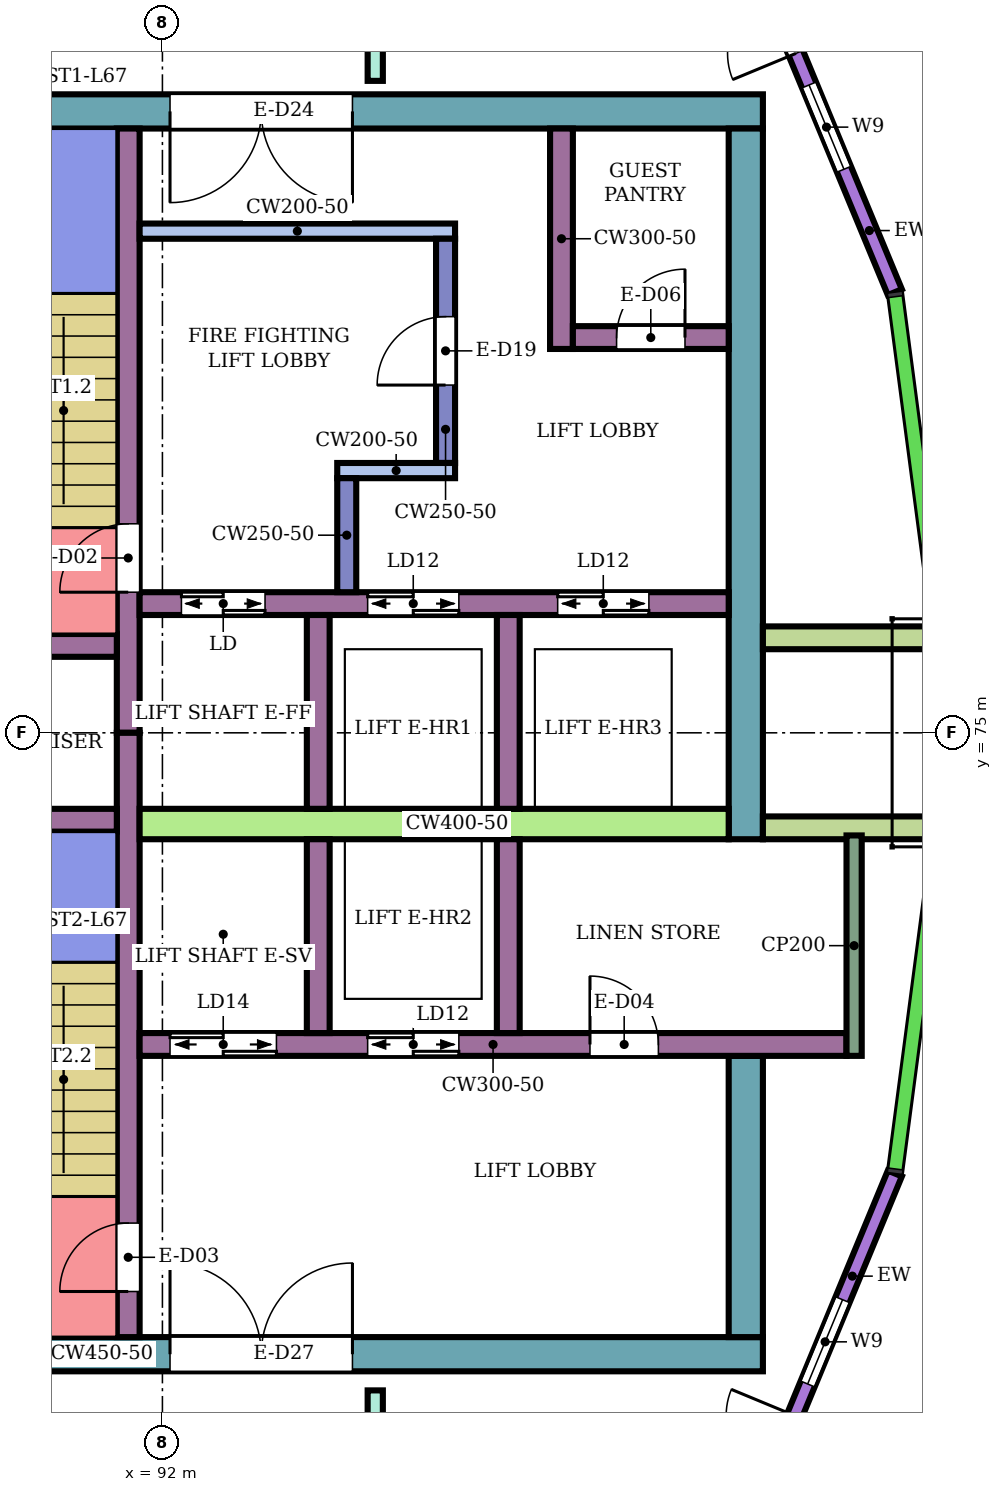
"""IFC4 building model, lengths in metres.
Left out: names, types, materials, properties, quantities, classifications, styles, units other than length and angle.
Written with IfcOpenShell. Run it as: python <this file> out.ifc"""

import sys

from ifc_helpers import new_model, si_unit, direction, frame, frame_2d, origin, place, context, subcontext, project, spatial, rectangle, extrude, element, fill, save


model = new_model("IFC4")
c1 = context("Model", 3, precision=1e-05, world=origin(), true_north=direction((0.0, 1.0)))
c2 = subcontext(c1, "Body", "Model", "MODEL_VIEW")
j1 = project(units=[si_unit("LENGTHUNIT", "METRE"), si_unit("PLANEANGLEUNIT", "RADIAN")], contexts=[c1])
p1 = place(None, origin())
s1 = spatial("IfcSite", under=j1, at=p1, CompositionType="ELEMENT")
p2 = place(p1, origin())
s2 = spatial("IfcBuilding", under=s1, at=p2, CompositionType="ELEMENT")
p3 = place(p2, frame((0.0, 0.0, 292.5)))
s3 = spatial("IfcBuildingStorey", under=s2, at=p3, CompositionType="ELEMENT", Elevation=292.5)
p4 = place(p3, frame((87.9, 83.175, 0.0), z_axis=(0.0, 0.0, 1.0), x_axis=(1.0, 0.0, 0.0)))
e1 = element("IfcWall", 1, at=p4, inside=s3, PredefinedType="SHEAR", context=c2, shape_type="SweptSolid", body=[
    extrude(rectangle(XDim=12.0, YDim=0.45, at=frame_2d((6.0, 0.0))), origin(), (0.0, 0.0, 1.0), 3.88),
])
p5 = place(p4, frame((4.2, 0.0, 0.0)))
e2 = element("IfcOpeningElement", 2, at=p5, cuts=e1, PredefinedType="OPENING", context=c2, shape_type="SweptSolid", body=[
    extrude(rectangle(XDim=2.4, YDim=2.4, at=frame_2d((1.2, 1.2))), frame((0.0, 0.235, 0.0), z_axis=(0.0, -1.0, 0.0), x_axis=(1.0, 0.0, 0.0)), (0.0, 0.0, 1.0), 0.47),
])
p6 = place(p3, frame((87.9, 66.825, 0.0), z_axis=(0.0, 0.0, 1.0), x_axis=(1.0, 0.0, 0.0)))
e3 = element("IfcWall", 3, at=p6, inside=s3, PredefinedType="SHEAR", context=c2, shape_type="SweptSolid", body=[
    extrude(rectangle(XDim=12.0, YDim=0.45, at=frame_2d((6.0, 0.0))), origin(), (0.0, 0.0, 1.0), 3.88),
])
p7 = place(p6, frame((4.2, 0.0, 0.0)))
e4 = element("IfcOpeningElement", 4, at=p7, cuts=e3, PredefinedType="OPENING", context=c2, shape_type="SweptSolid", body=[
    extrude(rectangle(XDim=2.4, YDim=2.4, at=frame_2d((1.2, 1.2))), frame((0.0, 0.235, 0.0), z_axis=(0.0, -1.0, 0.0), x_axis=(1.0, 0.0, 0.0)), (0.0, 0.0, 1.0), 0.47),
])
p8 = place(p3, frame((99.675, 73.6, 0.0), z_axis=(0.0, 0.0, 1.0), x_axis=(0.0, 1.0, 0.0)))
e5 = element("IfcWall", 5, at=p8, inside=s3, PredefinedType="SHEAR", context=c2, shape_type="SweptSolid", body=[
    extrude(rectangle(XDim=9.35, YDim=0.45, at=frame_2d((4.675, 0.0))), origin(), (0.0, 0.0, 1.0), 3.88),
])
p9 = place(p3, frame((99.675, 67.05, 0.0), z_axis=(0.0, 0.0, 1.0), x_axis=(0.0, 1.0, 0.0)))
e6 = element("IfcWall", 6, at=p9, inside=s3, PredefinedType="SHEAR", context=c2, shape_type="SweptSolid", body=[
    extrude(rectangle(XDim=3.7, YDim=0.45, at=frame_2d((1.85, 0.0))), origin(), (0.0, 0.0, 1.0), 3.88),
])
p10 = place(p3, frame((91.55, 75.0, 0.0), z_axis=(0.0, 0.0, 1.0), x_axis=(0.0, 1.0, 0.0)))
e7 = element("IfcWall", 7, at=p10, inside=s3, PredefinedType="SHEAR", context=c2, shape_type="SweptSolid", body=[
    extrude(rectangle(XDim=7.95, YDim=0.3, at=frame_2d((3.975, 0.0))), origin(), (0.0, 0.0, 1.0), 3.88),
])
p11 = place(p10, frame((1.85, 0.0, 0.0)))
e8 = element("IfcOpeningElement", 8, at=p11, cuts=e7, PredefinedType="OPENING", context=c2, shape_type="SweptSolid", body=[
    extrude(rectangle(XDim=0.9, YDim=2.1, at=frame_2d((0.45, 1.05))), frame((0.0, 0.16, 0.0), z_axis=(0.0, -1.0, 0.0), x_axis=(1.0, 0.0, 0.0)), (0.0, 0.0, 1.0), 0.32),
])
p12 = place(p3, frame((91.55, 67.05, 0.0), z_axis=(0.0, 0.0, 1.0), x_axis=(0.0, 1.0, 0.0)))
e9 = element("IfcWall", 9, at=p12, inside=s3, PredefinedType="SHEAR", context=c2, shape_type="SweptSolid", body=[
    extrude(rectangle(XDim=7.95, YDim=0.3, at=frame_2d((3.975, 0.0))), origin(), (0.0, 0.0, 1.0), 3.88),
])
p13 = place(p12, frame((0.6, 0.0, 0.0)))
e10 = element("IfcOpeningElement", 10, at=p13, cuts=e9, PredefinedType="OPENING", context=c2, shape_type="SweptSolid", body=[
    extrude(rectangle(XDim=0.9, YDim=2.1, at=frame_2d((0.45, 1.05))), frame((0.0, 0.16, 0.0), z_axis=(0.0, -1.0, 0.0), x_axis=(1.0, 0.0, 0.0)), (0.0, 0.0, 1.0), 0.32),
])
p14 = place(p3, frame((88.35, 76.15, 0.0), z_axis=(0.0, 0.0, 1.0), x_axis=(1.0, 0.0, 0.0)))
e11 = element("IfcWall", 11, at=p14, inside=s3, PredefinedType="SHEAR", context=c2, shape_type="SweptSolid", body=[
    extrude(rectangle(XDim=3.05, YDim=0.3, at=frame_2d((1.525, 0.0))), origin(), (0.0, 0.0, 1.0), 3.88),
])
p15 = place(p14, frame((1.1, 0.0, 0.0)))
e12 = element("IfcOpeningElement", 12, at=p15, cuts=e11, PredefinedType="OPENING", context=c2, shape_type="SweptSolid", body=[
    extrude(rectangle(XDim=0.7, YDim=2.0, at=frame_2d((0.35, 1.0))), frame((0.0, 0.16, 0.0), z_axis=(0.0, -1.0, 0.0), x_axis=(1.0, 0.0, 0.0)), (0.0, 0.0, 1.0), 0.32),
])
p16 = place(p3, frame((88.35, 73.85, 0.0), z_axis=(0.0, 0.0, 1.0), x_axis=(1.0, 0.0, 0.0)))
e13 = element("IfcWall", 13, at=p16, inside=s3, PredefinedType="SHEAR", context=c2, shape_type="SweptSolid", body=[
    extrude(rectangle(XDim=3.05, YDim=0.3, at=frame_2d((1.525, 0.0))), origin(), (0.0, 0.0, 1.0), 3.88),
])
p17 = place(p3, frame((91.7, 76.7, 0.0), z_axis=(0.0, 0.0, 1.0), x_axis=(1.0, 0.0, 0.0)))
e14 = element("IfcWall", 14, at=p17, inside=s3, PredefinedType="SHEAR", context=c2, shape_type="SweptSolid", body=[
    extrude(rectangle(XDim=7.75, YDim=0.3, at=frame_2d((3.875, 0.0))), origin(), (0.0, 0.0, 1.0), 3.88),
])
p18 = place(p17, frame((0.55, 0.0, 0.0)))
e15 = element("IfcOpeningElement", 15, at=p18, cuts=e14, PredefinedType="OPENING", context=c2, shape_type="SweptSolid", body=[
    extrude(rectangle(XDim=1.1, YDim=2.1, at=frame_2d((0.55, 1.05))), frame((0.0, 0.16, 0.0), z_axis=(0.0, -1.0, 0.0), x_axis=(1.0, 0.0, 0.0)), (0.0, 0.0, 1.0), 0.32),
])
p19 = place(p17, frame((3.0, 0.0, 0.0)))
e16 = element("IfcOpeningElement", 16, at=p19, cuts=e14, PredefinedType="OPENING", context=c2, shape_type="SweptSolid", body=[
    extrude(rectangle(XDim=1.2, YDim=2.1, at=frame_2d((0.6, 1.05))), frame((0.0, 0.16, 0.0), z_axis=(0.0, -1.0, 0.0), x_axis=(1.0, 0.0, 0.0)), (0.0, 0.0, 1.0), 0.32),
])
p20 = place(p17, frame((5.5, 0.0, 0.0)))
e17 = element("IfcOpeningElement", 17, at=p20, cuts=e14, PredefinedType="OPENING", context=c2, shape_type="SweptSolid", body=[
    extrude(rectangle(XDim=1.2, YDim=2.1, at=frame_2d((0.6, 1.05))), frame((0.0, 0.16, 0.0), z_axis=(0.0, -1.0, 0.0), x_axis=(1.0, 0.0, 0.0)), (0.0, 0.0, 1.0), 0.32),
])
p21 = place(p3, frame((91.7, 73.8, 0.0), z_axis=(0.0, 0.0, 1.0), x_axis=(1.0, 0.0, 0.0)))
e18 = element("IfcWall", 18, at=p21, inside=s3, PredefinedType="SHEAR", context=c2, shape_type="SweptSolid", body=[
    extrude(rectangle(XDim=7.75, YDim=0.4, at=frame_2d((3.875, 0.0))), origin(), (0.0, 0.0, 1.0), 3.88),
])
p22 = place(p3, frame((91.7, 70.9, 0.0), z_axis=(0.0, 0.0, 1.0), x_axis=(1.0, 0.0, 0.0)))
e19 = element("IfcWall", 19, at=p22, inside=s3, PredefinedType="SHEAR", context=c2, shape_type="SweptSolid", body=[
    extrude(rectangle(XDim=9.3, YDim=0.3, at=frame_2d((4.65, 0.0))), origin(), (0.0, 0.0, 1.0), 3.88),
])
p23 = place(p22, frame((0.4, 0.0, 0.0)))
e20 = element("IfcOpeningElement", 20, at=p23, cuts=e19, PredefinedType="OPENING", context=c2, shape_type="SweptSolid", body=[
    extrude(rectangle(XDim=1.4, YDim=2.1, at=frame_2d((0.7, 1.05))), frame((0.0, 0.16, 0.0), z_axis=(0.0, -1.0, 0.0), x_axis=(1.0, 0.0, 0.0)), (0.0, 0.0, 1.0), 0.32),
])
p24 = place(p22, frame((3.0, 0.0, 0.0)))
e21 = element("IfcOpeningElement", 21, at=p24, cuts=e19, PredefinedType="OPENING", context=c2, shape_type="SweptSolid", body=[
    extrude(rectangle(XDim=1.2, YDim=2.1, at=frame_2d((0.6, 1.05))), frame((0.0, 0.16, 0.0), z_axis=(0.0, -1.0, 0.0), x_axis=(1.0, 0.0, 0.0)), (0.0, 0.0, 1.0), 0.32),
])
p25 = place(p22, frame((5.925, 0.0, 0.0)))
e22 = element("IfcOpeningElement", 22, at=p25, cuts=e19, PredefinedType="OPENING", context=c2, shape_type="SweptSolid", body=[
    extrude(rectangle(XDim=0.9, YDim=2.1, at=frame_2d((0.45, 1.05))), frame((0.0, 0.16, 0.0), z_axis=(0.0, -1.0, 0.0), x_axis=(1.0, 0.0, 0.0)), (0.0, 0.0, 1.0), 0.32),
])
for number, where, z_axis, x_axis in (
    (23, (94.05, 74.0, 0.0), (0.0, 0.0, 1.0), (0.0, 1.0, 0.0)),
    (24, (96.55, 74.0, 0.0), (0.0, 0.0, 1.0), (0.0, 1.0, 0.0)),
    (25, (94.05, 71.05, 0.0), (0.0, 0.0, 1.0), (0.0, 1.0, 0.0)),
    (26, (96.55, 71.05, 0.0), (0.0, 0.0, 1.0), (0.0, 1.0, 0.0)),
):
    element("IfcWall", number, at=place(p3, frame(where, z_axis=z_axis, x_axis=x_axis)), inside=s3, PredefinedType="SHEAR", context=c2, shape_type="SweptSolid", body=[
        extrude(rectangle(XDim=2.55, YDim=0.3, at=frame_2d((1.275, 0.0))), origin(), (0.0, 0.0, 1.0), 3.88),
    ])
p26 = place(p3, frame((91.7, 81.6, 0.0), z_axis=(0.0, 0.0, 1.0), x_axis=(1.0, 0.0, 0.0)))
e27 = element("IfcWall", 27, at=p26, inside=s3, PredefinedType="SHEAR", context=c2, shape_type="SweptSolid", body=[
    extrude(rectangle(XDim=4.15, YDim=0.2, at=frame_2d((2.075, 0.0))), origin(), (0.0, 0.0, 1.0), 3.88),
])
p27 = place(p3, frame((95.725, 78.55, 0.0), z_axis=(0.0, 0.0, 1.0), x_axis=(0.0, 1.0, 0.0)))
e28 = element("IfcWall", 28, at=p27, inside=s3, PredefinedType="SHEAR", context=c2, shape_type="SweptSolid", body=[
    extrude(rectangle(XDim=2.95, YDim=0.25, at=frame_2d((1.475, 0.0))), origin(), (0.0, 0.0, 1.0), 3.88),
])
p28 = place(p27, frame((1.025, 0.0, 0.0)))
e29 = element("IfcOpeningElement", 29, at=p28, cuts=e28, PredefinedType="OPENING", context=c2, shape_type="SweptSolid", body=[
    extrude(rectangle(XDim=0.9, YDim=2.1, at=frame_2d((0.45, 1.05))), frame((0.0, 0.135, 0.0), z_axis=(0.0, -1.0, 0.0), x_axis=(1.0, 0.0, 0.0)), (0.0, 0.0, 1.0), 0.27),
])
p29 = place(p3, frame((94.3, 78.45, 0.0), z_axis=(0.0, 0.0, 1.0), x_axis=(1.0, 0.0, 0.0)))
e30 = element("IfcWall", 30, at=p29, inside=s3, PredefinedType="SHEAR", context=c2, shape_type="SweptSolid", body=[
    extrude(rectangle(XDim=1.55, YDim=0.2, at=frame_2d((0.775, 0.0))), origin(), (0.0, 0.0, 1.0), 3.88),
])
p30 = place(p3, frame((94.425, 76.85, 0.0), z_axis=(0.0, 0.0, 1.0), x_axis=(0.0, 1.0, 0.0)))
e31 = element("IfcWall", 31, at=p30, inside=s3, PredefinedType="SHEAR", context=c2, shape_type="SweptSolid", body=[
    extrude(rectangle(XDim=1.5, YDim=0.25, at=frame_2d((0.75, 0.0))), origin(), (0.0, 0.0, 1.0), 3.88),
])
p31 = place(p3, frame((97.25, 80.05, 0.0), z_axis=(0.0, 0.0, 1.0), x_axis=(0.0, 1.0, 0.0)))
e32 = element("IfcWall", 32, at=p31, inside=s3, PredefinedType="SHEAR", context=c2, shape_type="SweptSolid", body=[
    extrude(rectangle(XDim=2.9, YDim=0.3, at=frame_2d((1.45, 0.0))), origin(), (0.0, 0.0, 1.0), 3.88),
])
p32 = place(p3, frame((97.4, 80.2, 0.0), z_axis=(0.0, 0.0, 1.0), x_axis=(1.0, 0.0, 0.0)))
e33 = element("IfcWall", 33, at=p32, inside=s3, PredefinedType="SHEAR", context=c2, shape_type="SweptSolid", body=[
    extrude(rectangle(XDim=2.05, YDim=0.3, at=frame_2d((1.025, 0.0))), origin(), (0.0, 0.0, 1.0), 3.88),
])
p33 = place(p32, frame((0.575, 0.0, 0.0)))
e34 = element("IfcOpeningElement", 34, at=p33, cuts=e33, PredefinedType="OPENING", context=c2, shape_type="SweptSolid", body=[
    extrude(rectangle(XDim=0.9, YDim=2.1, at=frame_2d((0.45, 1.05))), frame((0.0, 0.16, 0.0), z_axis=(0.0, -1.0, 0.0), x_axis=(1.0, 0.0, 0.0)), (0.0, 0.0, 1.0), 0.32),
])
p34 = place(p3, frame((101.636, 80.797, 0.0), z_axis=(0.0, 0.0, 1.0), x_axis=(-0.382708254591, 0.923869250418, 0.0)))
e35 = element("IfcWall", 35, at=p34, inside=s3, PredefinedType="NOTDEFINED", context=c2, shape_type="SweptSolid", body=[
    extrude(rectangle(XDim=5.847, YDim=0.2, at=frame_2d((2.924, 0.0))), origin(), (0.0, 0.0, 1.0), 4.2),
])
p35 = place(p34, frame((1.75, 0.0, 0.9)))
e36 = element("IfcOpeningElement", 36, at=p35, cuts=e35, PredefinedType="OPENING", context=c2, shape_type="SweptSolid", body=[
    extrude(rectangle(XDim=1.2, YDim=2.7, at=frame_2d((0.6, 1.35))), frame((0.0, 0.11, 0.0), z_axis=(0.0, -1.0, 0.0), x_axis=(1.0, 0.0, 0.0)), (0.0, 0.0, 1.0), 0.22),
])
p36 = place(p34, frame((3.4, 0.0, 0.0)))
e37 = element("IfcOpeningElement", 37, at=p36, cuts=e35, PredefinedType="OPENING", context=c2, shape_type="SweptSolid", body=[
    extrude(rectangle(XDim=1.8, YDim=2.7, at=frame_2d((0.9, 1.35))), frame((0.0, 0.11, 0.0), z_axis=(0.0, -1.0, 0.0), x_axis=(1.0, 0.0, 0.0)), (0.0, 0.0, 1.0), 0.22),
])
p37 = place(p3, frame((99.398, 63.801, 0.0), z_axis=(0.0, 0.0, 1.0), x_axis=(0.382708254591, 0.923869250418, 0.0)))
e38 = element("IfcWall", 38, at=p37, inside=s3, PredefinedType="NOTDEFINED", context=c2, shape_type="SweptSolid", body=[
    extrude(rectangle(XDim=5.847, YDim=0.2, at=frame_2d((2.924, 0.0))), origin(), (0.0, 0.0, 1.0), 4.2),
])
p38 = place(p37, frame((0.6, 0.0, 0.0)))
e39 = element("IfcOpeningElement", 39, at=p38, cuts=e38, PredefinedType="OPENING", context=c2, shape_type="SweptSolid", body=[
    extrude(rectangle(XDim=1.8, YDim=2.7, at=frame_2d((0.9, 1.35))), frame((0.0, 0.11, 0.0), z_axis=(0.0, -1.0, 0.0), x_axis=(1.0, 0.0, 0.0)), (0.0, 0.0, 1.0), 0.22),
])
p39 = place(p37, frame((2.85, 0.0, 0.9)))
e40 = element("IfcOpeningElement", 40, at=p39, cuts=e38, PredefinedType="OPENING", context=c2, shape_type="SweptSolid", body=[
    extrude(rectangle(XDim=1.2, YDim=2.7, at=frame_2d((0.6, 1.35))), frame((0.0, 0.11, 0.0), z_axis=(0.0, -1.0, 0.0), x_axis=(1.0, 0.0, 0.0)), (0.0, 0.0, 1.0), 0.22),
])
for number, where, z_axis, x_axis in (
    (41, (99.9, 73.75, 0.0), (0.0, 0.0, 1.0), (1.0, 0.0, 0.0)),
    (42, (99.9, 76.25, 0.0), (0.0, 0.0, 1.0), (1.0, 0.0, 0.0)),
):
    element("IfcWall", number, at=place(p3, frame(where, z_axis=z_axis, x_axis=x_axis)), inside=s3, PredefinedType="NOTDEFINED", context=c2, shape_type="SweptSolid", body=[
        extrude(rectangle(XDim=2.416, YDim=0.3, at=frame_2d((1.208, 0.0))), origin(), (0.0, 0.0, 1.0), 4.2),
    ])
p40 = place(p3, frame((94.8, 65.1, 0.0), z_axis=(0.0, 0.0, 1.0), x_axis=(0.0, 1.0, 0.0)))
e43 = element("IfcWall", 43, at=p40, inside=s3, PredefinedType="PARTITIONING", context=c2, shape_type="SweptSolid", body=[
    extrude(rectangle(XDim=1.249, YDim=0.2, at=frame_2d((0.625, 0.0))), origin(), (0.0, 0.0, 1.0), 3.75),
])
p41 = place(p3, frame((94.8, 83.577, 0.0), z_axis=(0.0, 0.0, 1.0), x_axis=(0.0, 1.0, 0.0)))
e44 = element("IfcWall", 44, at=p41, inside=s3, PredefinedType="PARTITIONING", context=c2, shape_type="SweptSolid", body=[
    extrude(rectangle(XDim=1.323, YDim=0.2, at=frame_2d((0.662, 0.0))), origin(), (0.0, 0.0, 1.0), 3.75),
])
p42 = place(p3, frame((101.1, 70.75, 0.0), z_axis=(0.0, 0.0, 1.0), x_axis=(0.0, 1.0, 0.0)))
e45 = element("IfcWall", 45, at=p42, inside=s3, PredefinedType="PARTITIONING", context=c2, shape_type="SweptSolid", body=[
    extrude(rectangle(XDim=2.9, YDim=0.2, at=frame_2d((1.45, 0.0))), origin(), (0.0, 0.0, 1.0), 3.88),
])
p43 = place(p35, origin())
e46 = element("IfcWindow", 46, at=p43, inside=s3, PartitioningType="SINGLE_PANEL", PredefinedType="WINDOW", context=c2, shape_type="SweptSolid", body=[
    extrude(rectangle(XDim=1.2, YDim=2.7, at=frame_2d((0.6, 1.35))), frame((0.0, 0.03, 0.0), z_axis=(0.0, -1.0, 0.0), x_axis=(1.0, 0.0, 0.0)), (0.0, 0.0, 1.0), 0.06),
])
fill(e36, e46)
p44 = place(p36, origin())
e47 = element("IfcDoor", 47, at=p44, inside=s3, OperationType="DOUBLE_DOOR_SINGLE_SWING", PredefinedType="DOOR", context=c2, shape_type="SweptSolid", body=[
    extrude(rectangle(XDim=1.8, YDim=2.7, at=frame_2d((0.9, 1.35))), frame((0.0, 0.025, 0.0), z_axis=(0.0, -1.0, 0.0), x_axis=(1.0, 0.0, 0.0)), (0.0, 0.0, 1.0), 0.05),
])
fill(e37, e47)
p45 = place(p39, origin())
e48 = element("IfcWindow", 48, at=p45, inside=s3, PartitioningType="SINGLE_PANEL", PredefinedType="WINDOW", context=c2, shape_type="SweptSolid", body=[
    extrude(rectangle(XDim=1.2, YDim=2.7, at=frame_2d((0.6, 1.35))), frame((0.0, 0.03, 0.0), z_axis=(0.0, -1.0, 0.0), x_axis=(1.0, 0.0, 0.0)), (0.0, 0.0, 1.0), 0.06),
])
fill(e40, e48)
p46 = place(p11, origin())
e49 = element("IfcDoor", 49, at=p46, inside=s3, OperationType="SINGLE_SWING_LEFT", PredefinedType="DOOR", context=c2, shape_type="SweptSolid", body=[
    extrude(rectangle(XDim=0.9, YDim=2.1, at=frame_2d((0.45, 1.05))), frame((0.0, 0.025, 0.0), z_axis=(0.0, -1.0, 0.0), x_axis=(1.0, 0.0, 0.0)), (0.0, 0.0, 1.0), 0.05),
])
fill(e8, e49)
p47 = place(p13, origin())
e50 = element("IfcDoor", 50, at=p47, inside=s3, OperationType="SINGLE_SWING_LEFT", PredefinedType="DOOR", context=c2, shape_type="SweptSolid", body=[
    extrude(rectangle(XDim=0.9, YDim=2.1, at=frame_2d((0.45, 1.05))), frame((0.0, 0.025, 0.0), z_axis=(0.0, -1.0, 0.0), x_axis=(1.0, 0.0, 0.0)), (0.0, 0.0, 1.0), 0.05),
])
fill(e10, e50)
p48 = place(p18, origin())
e51 = element("IfcDoor", 51, at=p48, inside=s3, OperationType="DOUBLE_DOOR_SLIDING", PredefinedType="DOOR", context=c2, shape_type="SweptSolid", body=[
    extrude(rectangle(XDim=1.1, YDim=2.1, at=frame_2d((0.55, 1.05))), frame((0.0, 0.025, 0.0), z_axis=(0.0, -1.0, 0.0), x_axis=(1.0, 0.0, 0.0)), (0.0, 0.0, 1.0), 0.05),
])
fill(e15, e51)
p49 = place(p19, origin())
e52 = element("IfcDoor", 52, at=p49, inside=s3, OperationType="DOUBLE_DOOR_SLIDING", PredefinedType="DOOR", context=c2, shape_type="SweptSolid", body=[
    extrude(rectangle(XDim=1.2, YDim=2.1, at=frame_2d((0.6, 1.05))), frame((0.0, 0.025, 0.0), z_axis=(0.0, -1.0, 0.0), x_axis=(1.0, 0.0, 0.0)), (0.0, 0.0, 1.0), 0.05),
])
fill(e16, e52)
p50 = place(p20, origin())
e53 = element("IfcDoor", 53, at=p50, inside=s3, OperationType="DOUBLE_DOOR_SLIDING", PredefinedType="DOOR", context=c2, shape_type="SweptSolid", body=[
    extrude(rectangle(XDim=1.2, YDim=2.1, at=frame_2d((0.6, 1.05))), frame((0.0, 0.025, 0.0), z_axis=(0.0, -1.0, 0.0), x_axis=(1.0, 0.0, 0.0)), (0.0, 0.0, 1.0), 0.05),
])
fill(e17, e53)
p51 = place(p23, origin())
e54 = element("IfcDoor", 54, at=p51, inside=s3, OperationType="DOUBLE_DOOR_SLIDING", PredefinedType="DOOR", context=c2, shape_type="SweptSolid", body=[
    extrude(rectangle(XDim=1.4, YDim=2.1, at=frame_2d((0.7, 1.05))), frame((0.0, 0.025, 0.0), z_axis=(0.0, -1.0, 0.0), x_axis=(1.0, 0.0, 0.0)), (0.0, 0.0, 1.0), 0.05),
])
fill(e20, e54)
p52 = place(p24, origin())
e55 = element("IfcDoor", 55, at=p52, inside=s3, OperationType="DOUBLE_DOOR_SLIDING", PredefinedType="DOOR", context=c2, shape_type="SweptSolid", body=[
    extrude(rectangle(XDim=1.2, YDim=2.1, at=frame_2d((0.6, 1.05))), frame((0.0, 0.025, 0.0), z_axis=(0.0, -1.0, 0.0), x_axis=(1.0, 0.0, 0.0)), (0.0, 0.0, 1.0), 0.05),
])
fill(e21, e55)
p53 = place(p25, origin())
e56 = element("IfcDoor", 56, at=p53, inside=s3, OperationType="SINGLE_SWING_LEFT", PredefinedType="DOOR", context=c2, shape_type="SweptSolid", body=[
    extrude(rectangle(XDim=0.9, YDim=2.1, at=frame_2d((0.45, 1.05))), frame((0.0, 0.025, 0.0), z_axis=(0.0, -1.0, 0.0), x_axis=(1.0, 0.0, 0.0)), (0.0, 0.0, 1.0), 0.05),
])
fill(e22, e56)
p54 = place(p28, origin())
e57 = element("IfcDoor", 57, at=p54, inside=s3, OperationType="SINGLE_SWING_LEFT", PredefinedType="DOOR", context=c2, shape_type="SweptSolid", body=[
    extrude(rectangle(XDim=0.9, YDim=2.1, at=frame_2d((0.45, 1.05))), frame((0.0, 0.025, 0.0), z_axis=(0.0, -1.0, 0.0), x_axis=(1.0, 0.0, 0.0)), (0.0, 0.0, 1.0), 0.05),
])
fill(e29, e57)
p55 = place(p33, origin())
e58 = element("IfcDoor", 58, at=p55, inside=s3, OperationType="SINGLE_SWING_RIGHT", PredefinedType="DOOR", context=c2, shape_type="SweptSolid", body=[
    extrude(rectangle(XDim=0.9, YDim=2.1, at=frame_2d((0.45, 1.05))), frame((0.0, 0.025, 0.0), z_axis=(0.0, -1.0, 0.0), x_axis=(1.0, 0.0, 0.0)), (0.0, 0.0, 1.0), 0.05),
])
fill(e34, e58)
p56 = place(p5, frame((2.4, 0.0, 0.0), z_axis=(0.0, 0.0, 1.0), x_axis=(-1.0, 0.0, 0.0)))
e59 = element("IfcDoor", 59, at=p56, inside=s3, OperationType="DOUBLE_DOOR_SINGLE_SWING", PredefinedType="DOOR", context=c2, shape_type="SweptSolid", body=[
    extrude(rectangle(XDim=2.4, YDim=2.4, at=frame_2d((1.2, 1.2))), frame((0.0, 0.025, 0.0), z_axis=(0.0, -1.0, 0.0), x_axis=(1.0, 0.0, 0.0)), (0.0, 0.0, 1.0), 0.05),
])
fill(e2, e59)
p57 = place(p7, origin())
e60 = element("IfcDoor", 60, at=p57, inside=s3, OperationType="DOUBLE_DOOR_SINGLE_SWING", PredefinedType="DOOR", context=c2, shape_type="SweptSolid", body=[
    extrude(rectangle(XDim=2.4, YDim=2.4, at=frame_2d((1.2, 1.2))), frame((0.0, 0.025, 0.0), z_axis=(0.0, -1.0, 0.0), x_axis=(1.0, 0.0, 0.0)), (0.0, 0.0, 1.0), 0.05),
])
fill(e4, e60)
save(model, sys.argv[1])
